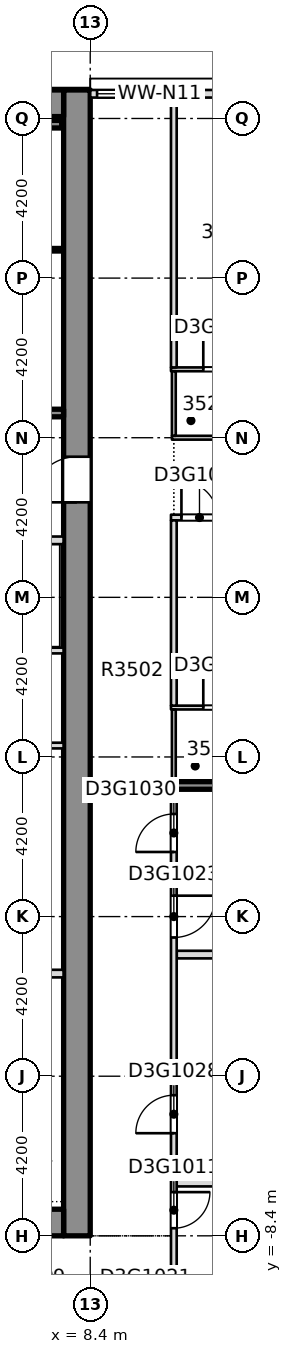
"""IFC4 building model, lengths in metres.
Left out: names, types, materials, properties, quantities, classifications, styles, units other than length and angle.
Written with IfcOpenShell. Run it as: python <this file> out.ifc"""

import sys

from ifc_helpers import new_model, si_unit, direction, frame, frame_2d, origin, place, context, subcontext, project, spatial, rectangle, extrude, element, fill, save


model = new_model("IFC4")
c1 = context("Model", 3, precision=1e-05, world=origin(), true_north=direction((0.0, 1.0)))
c2 = subcontext(c1, "Body", "Model", "MODEL_VIEW")
j1 = project(units=[si_unit("LENGTHUNIT", "METRE"), si_unit("PLANEANGLEUNIT", "RADIAN")], contexts=[c1])
p1 = place(None, origin())
s1 = spatial("IfcSite", under=j1, at=p1, CompositionType="ELEMENT")
p2 = place(p1, origin())
s2 = spatial("IfcBuilding", under=s1, at=p2, CompositionType="ELEMENT")
p3 = place(p2, frame((0.0, 0.0, 140.0)))
s3 = spatial("IfcBuildingStorey", under=s2, at=p3, CompositionType="ELEMENT", Elevation=140.0)
p4 = place(p3, frame((8.05, -8.4, -0.4), z_axis=(0.0, 0.0, 1.0), x_axis=(0.0, 1.0, 0.0)))
e1 = element("IfcWall", 1, at=p4, inside=s3, PredefinedType="SOLIDWALL", context=c2, shape_type="SweptSolid", body=[
    extrude(rectangle(XDim=30.15, YDim=0.7, at=frame_2d((15.075, 0.0))), origin(), (0.0, 0.0, 1.0), 3.45),
])
p5 = place(p4, frame((19.3, 0.0, 0.4)))
e2 = element("IfcOpeningElement", 2, at=p5, cuts=e1, PredefinedType="OPENING", context=c2, shape_type="SweptSolid", body=[
    extrude(rectangle(XDim=1.2, YDim=2.1, at=frame_2d((0.6, 1.05))), frame((0.0, 0.36, 0.0), z_axis=(0.0, -1.0, 0.0), x_axis=(1.0, 0.0, 0.0)), (0.0, 0.0, 1.0), 0.72),
])
p6 = place(p3, frame((-7.7, -8.05, -0.4), z_axis=(0.0, 0.0, 1.0), x_axis=(1.0, 0.0, 0.0)))
e3 = element("IfcWall", 3, at=p6, inside=s3, PredefinedType="SHEAR", context=c2, shape_type="SweptSolid", body=[
    extrude(rectangle(XDim=15.4, YDim=0.7, at=frame_2d((7.7, 0.0))), origin(), (0.0, 0.0, 1.0), 3.45),
])
p7 = place(p6, frame((2.95, 0.0, 0.4)))
e4 = element("IfcOpeningElement", 4, at=p7, cuts=e3, PredefinedType="OPENING", context=c2, shape_type="SweptSolid", body=[
    extrude(rectangle(XDim=1.8, YDim=2.1, at=frame_2d((0.9, 1.05))), frame((0.0, 0.36, 0.0), z_axis=(0.0, -1.0, 0.0), x_axis=(1.0, 0.0, 0.0)), (0.0, 0.0, 1.0), 0.72),
])
p8 = place(p6, frame((10.65, 0.0, 0.4)))
e5 = element("IfcOpeningElement", 5, at=p8, cuts=e3, PredefinedType="OPENING", context=c2, shape_type="SweptSolid", body=[
    extrude(rectangle(XDim=1.8, YDim=2.1, at=frame_2d((0.9, 1.05))), frame((0.0, 0.36, 0.0), z_axis=(0.0, -1.0, 0.0), x_axis=(1.0, 0.0, 0.0)), (0.0, 0.0, 1.0), 0.72),
])
p9 = place(p3, frame((-7.7, 21.4, -0.4), z_axis=(0.0, 0.0, 1.0), x_axis=(1.0, 0.0, 0.0)))
e6 = element("IfcWall", 6, at=p9, inside=s3, PredefinedType="SHEAR", context=c2, shape_type="SweptSolid", body=[
    extrude(rectangle(XDim=15.4, YDim=0.7, at=frame_2d((7.7, 0.0))), origin(), (0.0, 0.0, 1.0), 3.45),
])
p10 = place(p3, frame((10.675, -7.0, 0.0), z_axis=(0.0, 0.0, 1.0), x_axis=(1.0, 0.0, 0.0)))
e7 = element("IfcWall", 7, at=p10, inside=s3, PredefinedType="PARTITIONING", context=c2, shape_type="SweptSolid", body=[
    extrude(rectangle(XDim=10.875, YDim=0.2, at=frame_2d((5.438, 0.0))), origin(), (0.0, 0.0, 1.0), 3.05),
])
p11 = place(p3, frame((10.677, -1.0, 0.0), z_axis=(0.0, 0.0, 1.0), x_axis=(1.0, 0.0, 0.0)))
e8 = element("IfcWall", 8, at=p11, inside=s3, PredefinedType="PARTITIONING", context=c2, shape_type="SweptSolid", body=[
    extrude(rectangle(XDim=6.071, YDim=0.2, at=frame_2d((3.036, 0.0))), origin(), (0.0, 0.0, 1.0), 3.05),
])
p12 = place(p3, frame((10.675, 1.0, 0.0), z_axis=(0.0, 0.0, 1.0), x_axis=(1.0, 0.0, 0.0)))
e9 = element("IfcWall", 9, at=p12, inside=s3, PredefinedType="PARTITIONING", context=c2, shape_type="SweptSolid", body=[
    extrude(rectangle(XDim=6.075, YDim=0.2, at=frame_2d((3.038, 0.0))), origin(), (0.0, 0.0, 1.0), 3.05),
])
p13 = place(p3, frame((10.525, 3.45, 0.0), z_axis=(0.0, 0.0, 1.0), x_axis=(1.0, 0.0, 0.0)))
e10 = element("IfcWall", 10, at=p13, inside=s3, PredefinedType="SOLIDWALL", context=c2, shape_type="SweptSolid", body=[
    extrude(rectangle(XDim=2.525, YDim=0.2, at=frame_2d((1.263, 0.0))), origin(), (0.0, 0.0, 1.0), 3.05),
])
p14 = place(p3, frame((10.525, 5.5, 0.0), z_axis=(0.0, 0.0, 1.0), x_axis=(1.0, 0.0, 0.0)))
e11 = element("IfcWall", 11, at=p14, inside=s3, PredefinedType="PARTITIONING", context=c2, shape_type="SweptSolid", body=[
    extrude(rectangle(XDim=2.525, YDim=0.1, at=frame_2d((1.263, 0.0))), origin(), (0.0, 0.0, 1.0), 3.05),
])
p15 = place(p14, frame((0.85, 0.0, 0.0)))
e12 = element("IfcOpeningElement", 12, at=p15, cuts=e11, PredefinedType="OPENING", context=c2, shape_type="SweptSolid", body=[
    extrude(rectangle(XDim=0.85, YDim=2.1, at=frame_2d((0.425, 1.05))), frame((0.0, 0.06, 0.0), z_axis=(0.0, -1.0, 0.0), x_axis=(1.0, 0.0, 0.0)), (0.0, 0.0, 1.0), 0.12),
])
p16 = place(p3, frame((10.525, 10.5, 0.0), z_axis=(0.0, 0.0, 1.0), x_axis=(1.0, 0.0, 0.0)))
e13 = element("IfcWall", 13, at=p16, inside=s3, PredefinedType="PARTITIONING", context=c2, shape_type="SweptSolid", body=[
    extrude(rectangle(XDim=11.025, YDim=0.15, at=frame_2d((5.513, 0.0))), origin(), (0.0, 0.0, 1.0), 3.05),
])
p17 = place(p16, frame((0.275, 0.0, 0.0)))
e14 = element("IfcOpeningElement", 14, at=p17, cuts=e13, PredefinedType="OPENING", context=c2, shape_type="SweptSolid", body=[
    extrude(rectangle(XDim=0.95, YDim=2.1, at=frame_2d((0.475, 1.05))), frame((0.0, 0.085, 0.0), z_axis=(0.0, -1.0, 0.0), x_axis=(1.0, 0.0, 0.0)), (0.0, 0.0, 1.0), 0.17),
])
p18 = place(p3, frame((10.55, 12.6, 0.0), z_axis=(0.0, 0.0, 1.0), x_axis=(1.0, 0.0, 0.0)))
e15 = element("IfcWall", 15, at=p18, inside=s3, PredefinedType="PARTITIONING", context=c2, shape_type="SweptSolid", body=[
    extrude(rectangle(XDim=2.5, YDim=0.1, at=frame_2d((1.25, 0.0))), origin(), (0.0, 0.0, 1.0), 3.05),
])
p19 = place(p3, frame((10.525, 14.4, 0.0), z_axis=(0.0, 0.0, 1.0), x_axis=(1.0, 0.0, 0.0)))
e16 = element("IfcWall", 16, at=p19, inside=s3, PredefinedType="PARTITIONING", context=c2, shape_type="SweptSolid", body=[
    extrude(rectangle(XDim=2.525, YDim=0.1, at=frame_2d((1.263, 0.0))), origin(), (0.0, 0.0, 1.0), 3.05),
])
p20 = place(p19, frame((0.85, 0.0, 0.0)))
e17 = element("IfcOpeningElement", 17, at=p20, cuts=e16, PredefinedType="OPENING", context=c2, shape_type="SweptSolid", body=[
    extrude(rectangle(XDim=0.85, YDim=2.1, at=frame_2d((0.425, 1.05))), frame((0.0, 0.06, 0.0), z_axis=(0.0, -1.0, 0.0), x_axis=(1.0, 0.0, 0.0)), (0.0, 0.0, 1.0), 0.12),
])
p21 = place(p3, frame((10.6, -10.29, 0.0), z_axis=(0.0, 0.0, 1.0), x_axis=(0.0, 1.0, 0.0)))
e18 = element("IfcWall", 18, at=p21, inside=s3, PredefinedType="PARTITIONING", context=c2, shape_type="SweptSolid", body=[
    extrude(rectangle(XDim=13.64, YDim=0.15, at=frame_2d((6.82, 0.0))), origin(), (0.0, 0.0, 1.0), 3.05),
])
p22 = place(p21, frame((2.09, 0.0, 0.0)))
e19 = element("IfcOpeningElement", 19, at=p22, cuts=e18, PredefinedType="OPENING", context=c2, shape_type="SweptSolid", body=[
    extrude(rectangle(XDim=0.95, YDim=2.1, at=frame_2d((0.475, 1.05))), frame((0.0, 0.085, 0.0), z_axis=(0.0, -1.0, 0.0), x_axis=(1.0, 0.0, 0.0)), (0.0, 0.0, 1.0), 0.17),
])
p23 = place(p21, frame((9.74, 0.0, 0.0)))
e20 = element("IfcOpeningElement", 20, at=p23, cuts=e18, PredefinedType="OPENING", context=c2, shape_type="SweptSolid", body=[
    extrude(rectangle(XDim=1.1, YDim=2.1, at=frame_2d((0.55, 1.05))), frame((0.0, 0.085, 0.0), z_axis=(0.0, -1.0, 0.0), x_axis=(1.0, 0.0, 0.0)), (0.0, 0.0, 1.0), 0.17),
])
p24 = place(p21, frame((4.59, 0.0, 0.0)))
e21 = element("IfcOpeningElement", 21, at=p24, cuts=e18, PredefinedType="OPENING", context=c2, shape_type="SweptSolid", body=[
    extrude(rectangle(XDim=1.0, YDim=2.1, at=frame_2d((0.5, 1.05))), frame((0.0, 0.085, 0.0), z_axis=(0.0, -1.0, 0.0), x_axis=(1.0, 0.0, 0.0)), (0.0, 0.0, 1.0), 0.17),
])
p25 = place(p21, frame((11.99, 0.0, 0.0)))
e22 = element("IfcOpeningElement", 22, at=p25, cuts=e18, PredefinedType="OPENING", context=c2, shape_type="SweptSolid", body=[
    extrude(rectangle(XDim=1.0, YDim=2.1, at=frame_2d((0.5, 1.05))), frame((0.0, 0.085, 0.0), z_axis=(0.0, -1.0, 0.0), x_axis=(1.0, 0.0, 0.0)), (0.0, 0.0, 1.0), 0.17),
])
p26 = place(p3, frame((10.6, 3.45, 0.0), z_axis=(0.0, 0.0, 1.0), x_axis=(0.0, 1.0, 0.0)))
e23 = element("IfcWall", 23, at=p26, inside=s3, PredefinedType="PARTITIONING", context=c2, shape_type="SweptSolid", body=[
    extrude(rectangle(XDim=2.0, YDim=0.1, at=frame_2d((1.0, 0.0))), origin(), (0.0, 0.0, 1.0), 3.05),
])
p27 = place(p3, frame((10.6, 5.55, 0.0), z_axis=(0.0, 0.0, 1.0), x_axis=(0.0, 1.0, 0.0)))
e24 = element("IfcWall", 24, at=p27, inside=s3, PredefinedType="PARTITIONING", context=c2, shape_type="SweptSolid", body=[
    extrude(rectangle(XDim=4.875, YDim=0.15, at=frame_2d((2.438, 0.0))), origin(), (0.0, 0.0, 1.0), 3.05),
])
p28 = place(p3, frame((10.6, 12.65, 0.0), z_axis=(0.0, 0.0, 1.0), x_axis=(0.0, 1.0, 0.0)))
e25 = element("IfcWall", 25, at=p28, inside=s3, PredefinedType="PARTITIONING", context=c2, shape_type="SweptSolid", body=[
    extrude(rectangle(XDim=1.7, YDim=0.1, at=frame_2d((0.85, 0.0))), origin(), (0.0, 0.0, 1.0), 3.05),
])
p29 = place(p3, frame((10.6, 14.45, 0.0), z_axis=(0.0, 0.0, 1.0), x_axis=(0.0, 1.0, 0.0)))
e26 = element("IfcWall", 26, at=p29, inside=s3, PredefinedType="PARTITIONING", context=c2, shape_type="SweptSolid", body=[
    extrude(rectangle(XDim=7.1, YDim=0.15, at=frame_2d((3.55, 0.0))), origin(), (0.0, 0.0, 1.0), 3.05),
])
p30 = place(p3, frame((12.05, 21.65, 0.0), z_axis=(0.0, 0.0, 1.0), x_axis=(-1.0, 0.0, 0.0)))
e27 = element("IfcWall", 27, at=p30, inside=s3, PredefinedType="STANDARD", context=c2, shape_type="SweptSolid", body=[
    extrude(rectangle(XDim=3.65, YDim=0.2, at=frame_2d((1.825, 0.0))), origin(), (0.0, 0.0, 1.0), 3.05),
])
p31 = place(p30, frame((1.67, 0.0, 0.2)))
e28 = element("IfcOpeningElement", 28, at=p31, cuts=e27, PredefinedType="OPENING", context=c2, shape_type="SweptSolid", body=[
    extrude(rectangle(XDim=1.8, YDim=2.65, at=frame_2d((0.9, 1.325))), frame((0.0, 0.11, 0.0), z_axis=(0.0, -1.0, 0.0), x_axis=(1.0, 0.0, 0.0)), (0.0, 0.0, 1.0), 0.22),
])
p32 = place(p3, frame((5.575, -1.5, 0.0), z_axis=(0.0, 0.0, 1.0), x_axis=(1.0, 0.0, 0.0)))
e29 = element("IfcWall", 29, at=p32, inside=s3, PredefinedType="PARTITIONING", context=c2, shape_type="SweptSolid", body=[
    extrude(rectangle(XDim=2.124, YDim=0.2, at=frame_2d((1.062, 0.0))), origin(), (0.0, 0.0, 1.0), 3.05),
])
p33 = place(p3, frame((5.425, 4.5, 0.0), z_axis=(0.0, 0.0, 1.0), x_axis=(1.0, 0.0, 0.0)))
e30 = element("IfcWall", 30, at=p33, inside=s3, PredefinedType="PARTITIONING", context=c2, shape_type="SweptSolid", body=[
    extrude(rectangle(XDim=2.274, YDim=0.15, at=frame_2d((1.137, 0.0))), origin(), (0.0, 0.0, 1.0), 3.05),
])
p34 = place(p3, frame((-7.699, 7.0, 0.0), z_axis=(0.0, 0.0, 1.0), x_axis=(1.0, 0.0, 0.0)))
e31 = element("IfcWall", 31, at=p34, inside=s3, PredefinedType="PARTITIONING", context=c2, shape_type="SweptSolid", body=[
    extrude(rectangle(XDim=15.398, YDim=0.15, at=frame_2d((7.699, 0.0))), origin(), (0.0, 0.0, 1.0), 3.05),
])
p35 = place(p34, frame((6.999, 0.0, 0.0)))
e32 = element("IfcOpeningElement", 32, at=p35, cuts=e31, PredefinedType="OPENING", context=c2, shape_type="SweptSolid", body=[
    extrude(rectangle(XDim=1.4, YDim=2.1, at=frame_2d((0.7, 1.05))), frame((0.0, 0.085, 0.0), z_axis=(0.0, -1.0, 0.0), x_axis=(1.0, 0.0, 0.0)), (0.0, 0.0, 1.0), 0.17),
])
p36 = place(p3, frame((3.6, 9.9, 0.0), z_axis=(0.0, 0.0, 1.0), x_axis=(1.0, 0.0, 0.0)))
e33 = element("IfcWall", 33, at=p36, inside=s3, PredefinedType="PARTITIONING", context=c2, shape_type="SweptSolid", body=[
    extrude(rectangle(XDim=4.099, YDim=0.2, at=frame_2d((2.049, 0.0))), origin(), (0.0, 0.0, 1.0), 3.05),
])
p37 = place(p36, frame((2.25, 0.0, 0.0)))
e34 = element("IfcOpeningElement", 34, at=p37, cuts=e33, PredefinedType="OPENING", context=c2, shape_type="SweptSolid", body=[
    extrude(rectangle(XDim=1.1, YDim=2.1, at=frame_2d((0.55, 1.05))), frame((0.0, 0.11, 0.0), z_axis=(0.0, -1.0, 0.0), x_axis=(1.0, 0.0, 0.0)), (0.0, 0.0, 1.0), 0.22),
])
p38 = place(p3, frame((3.425, 13.25, 0.0), z_axis=(0.0, 0.0, 1.0), x_axis=(1.0, 0.0, 0.0)))
e35 = element("IfcWall", 35, at=p38, inside=s3, PredefinedType="SOLIDWALL", context=c2, shape_type="SweptSolid", body=[
    extrude(rectangle(XDim=4.274, YDim=0.2, at=frame_2d((2.137, 0.0))), origin(), (0.0, 0.0, 1.0), 3.05),
])
p39 = place(p38, frame((1.825, 0.0, 0.0)))
e36 = element("IfcOpeningElement", 36, at=p39, cuts=e35, PredefinedType="OPENING", context=c2, shape_type="SweptSolid", body=[
    extrude(rectangle(XDim=1.2, YDim=2.1, at=frame_2d((0.6, 1.05))), frame((0.0, 0.11, 0.0), z_axis=(0.0, -1.0, 0.0), x_axis=(1.0, 0.0, 0.0)), (0.0, 0.0, 1.0), 0.22),
])
p40 = place(p3, frame((4.1, 20.85, 0.0), z_axis=(0.0, 0.0, 1.0), x_axis=(1.0, 0.0, 0.0)))
e37 = element("IfcWall", 37, at=p40, inside=s3, PredefinedType="SOLIDWALL", context=c2, shape_type="SweptSolid", body=[
    extrude(rectangle(XDim=3.55, YDim=0.2, at=frame_2d((1.775, 0.0))), origin(), (0.0, 0.0, 1.0), 3.05),
])
p41 = place(p22, origin())
e38 = element("IfcDoor", 38, at=p41, inside=s3, OperationType="SINGLE_SWING_LEFT", PredefinedType="DOOR", context=c2, shape_type="SweptSolid", body=[
    extrude(rectangle(XDim=0.95, YDim=2.1, at=frame_2d((0.475, 1.05))), frame((0.0, 0.025, 0.0), z_axis=(0.0, -1.0, 0.0), x_axis=(1.0, 0.0, 0.0)), (0.0, 0.0, 1.0), 0.05),
])
fill(e19, e38)
p42 = place(p17, origin())
e39 = element("IfcDoor", 39, at=p42, inside=s3, OperationType="SINGLE_SWING_RIGHT", PredefinedType="DOOR", context=c2, shape_type="SweptSolid", body=[
    extrude(rectangle(XDim=0.95, YDim=2.1, at=frame_2d((0.475, 1.05))), frame((0.0, 0.025, 0.0), z_axis=(0.0, -1.0, 0.0), x_axis=(1.0, 0.0, 0.0)), (0.0, 0.0, 1.0), 0.05),
])
fill(e14, e39)
p43 = place(p15, origin())
e40 = element("IfcDoor", 40, at=p43, inside=s3, OperationType="SINGLE_SWING_RIGHT", PredefinedType="DOOR", context=c2, shape_type="SweptSolid", body=[
    extrude(rectangle(XDim=0.85, YDim=2.1, at=frame_2d((0.425, 1.05))), frame((0.0, 0.025, 0.0), z_axis=(0.0, -1.0, 0.0), x_axis=(1.0, 0.0, 0.0)), (0.0, 0.0, 1.0), 0.05),
])
fill(e12, e40)
p44 = place(p20, origin())
e41 = element("IfcDoor", 41, at=p44, inside=s3, OperationType="SINGLE_SWING_RIGHT", PredefinedType="DOOR", context=c2, shape_type="SweptSolid", body=[
    extrude(rectangle(XDim=0.85, YDim=2.1, at=frame_2d((0.425, 1.05))), frame((0.0, 0.025, 0.0), z_axis=(0.0, -1.0, 0.0), x_axis=(1.0, 0.0, 0.0)), (0.0, 0.0, 1.0), 0.05),
])
fill(e17, e41)
p45 = place(p23, origin())
e42 = element("IfcDoor", 42, at=p45, inside=s3, OperationType="SINGLE_SWING_LEFT", PredefinedType="DOOR", context=c2, shape_type="SweptSolid", body=[
    extrude(rectangle(XDim=1.1, YDim=2.1, at=frame_2d((0.55, 1.05))), frame((0.0, 0.025, 0.0), z_axis=(0.0, -1.0, 0.0), x_axis=(1.0, 0.0, 0.0)), (0.0, 0.0, 1.0), 0.05),
])
fill(e20, e42)
p46 = place(p24, origin())
e43 = element("IfcDoor", 43, at=p46, inside=s3, OperationType="SINGLE_SWING_RIGHT", PredefinedType="DOOR", context=c2, shape_type="SweptSolid", body=[
    extrude(rectangle(XDim=1.0, YDim=2.1, at=frame_2d((0.5, 1.05))), frame((0.0, 0.025, 0.0), z_axis=(0.0, -1.0, 0.0), x_axis=(1.0, 0.0, 0.0)), (0.0, 0.0, 1.0), 0.05),
])
fill(e21, e43)
p47 = place(p25, origin())
e44 = element("IfcDoor", 44, at=p47, inside=s3, OperationType="SINGLE_SWING_LEFT", PredefinedType="DOOR", context=c2, shape_type="SweptSolid", body=[
    extrude(rectangle(XDim=1.0, YDim=2.1, at=frame_2d((0.5, 1.05))), frame((0.0, 0.025, 0.0), z_axis=(0.0, -1.0, 0.0), x_axis=(1.0, 0.0, 0.0)), (0.0, 0.0, 1.0), 0.05),
])
fill(e22, e44)
p48 = place(p31, origin())
e45 = element("IfcWindow", 45, at=p48, inside=s3, PartitioningType="SINGLE_PANEL", PredefinedType="WINDOW", context=c2, shape_type="SweptSolid", body=[
    extrude(rectangle(XDim=1.8, YDim=2.65, at=frame_2d((0.9, 1.325))), frame((0.0, 0.03, 0.0), z_axis=(0.0, -1.0, 0.0), x_axis=(1.0, 0.0, 0.0)), (0.0, 0.0, 1.0), 0.06),
])
fill(e28, e45)
p49 = place(p5, origin())
e46 = element("IfcDoor", 46, at=p49, inside=s3, OperationType="SINGLE_SWING_LEFT", PredefinedType="DOOR", context=c2, shape_type="SweptSolid", body=[
    extrude(rectangle(XDim=1.2, YDim=2.1, at=frame_2d((0.6, 1.05))), frame((0.0, 0.025, 0.0), z_axis=(0.0, -1.0, 0.0), x_axis=(1.0, 0.0, 0.0)), (0.0, 0.0, 1.0), 0.05),
])
fill(e2, e46)
save(model, sys.argv[1])
